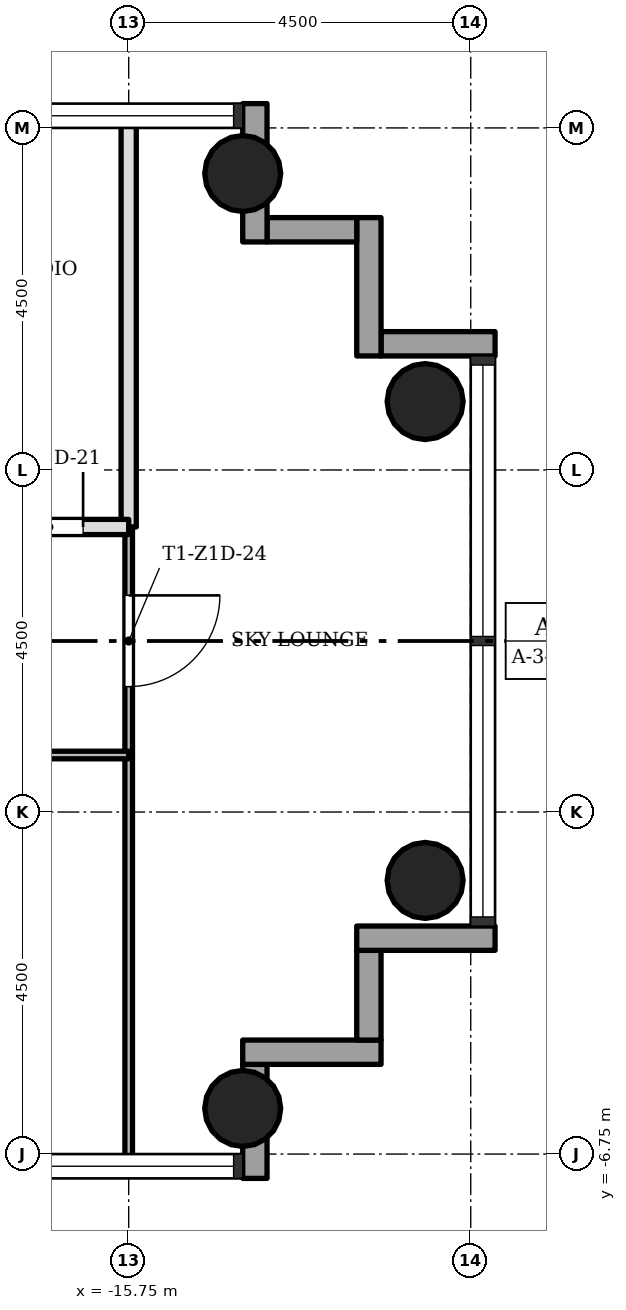
"""IFC4 building model, lengths in metres.
Left out: names, types, materials, properties, quantities, classifications, styles, units other than length and angle.
Written with IfcOpenShell. Run it as: python <this file> out.ifc"""

import sys

from ifc_helpers import new_model, si_unit, direction, frame, frame_2d, origin, origin_2d, place, context, subcontext, project, spatial, rectangle, hollow_circle, extrude, element, fill, save


model = new_model("IFC4")
c1 = context("Model", 3, precision=1e-05, world=origin(), true_north=direction((0.0, 1.0)))
c2 = subcontext(c1, "Body", "Model", "MODEL_VIEW")
j1 = project(units=[si_unit("LENGTHUNIT", "METRE"), si_unit("PLANEANGLEUNIT", "RADIAN")], contexts=[c1])
p1 = place(None, origin())
s1 = spatial("IfcSite", under=j1, at=p1, CompositionType="ELEMENT")
p2 = place(p1, origin())
s2 = spatial("IfcBuilding", under=s1, at=p2, CompositionType="ELEMENT")
p3 = place(p2, frame((0.0, 0.0, 61.9)))
s3 = spatial("IfcBuildingStorey", under=s2, at=p3, CompositionType="ELEMENT", Elevation=61.9)
for number, where, z_axis, x_axis in (
    (1, (-14.25, -6.15, 0.0), (0.0, 0.0, 1.0), (1.0, 0.0, 0.0)),
    (2, (-14.25, 6.15, 0.0), (0.0, 0.0, 1.0), (1.0, 0.0, 0.0)),
    (3, (-11.85, -3.15, 0.0), (0.0, 0.0, 1.0), (1.0, 0.0, 0.0)),
    (4, (-11.85, 3.15, 0.0), (0.0, 0.0, 1.0), (1.0, 0.0, 0.0)),
):
    element("IfcColumn", number, at=place(p3, frame(where, z_axis=z_axis, x_axis=x_axis)), inside=s3, PredefinedType="COLUMN", context=c2, shape_type="SweptSolid", body=[
        extrude(hollow_circle(Radius=0.5, WallThickness=0.036, at=origin_2d()), origin(), (0.0, 0.0, 1.0), 3.4),
    ])
p4 = place(p3, frame((-14.09, -7.07, -0.3), z_axis=(0.0, 0.0, 1.0), x_axis=(0.0, 1.0, 0.0)))
e5 = element("IfcWall", 5, at=p4, inside=s3, PredefinedType="STANDARD", context=c2, shape_type="SweptSolid", body=[
    extrude(rectangle(XDim=1.5, YDim=0.32, at=frame_2d((0.75, 0.0))), origin(), (0.0, 0.0, 1.0), 3.4),
])
p5 = place(p3, frame((-14.25, -5.41, -0.3), z_axis=(0.0, 0.0, 1.0), x_axis=(1.0, 0.0, 0.0)))
e6 = element("IfcWall", 6, at=p5, inside=s3, PredefinedType="STANDARD", context=c2, shape_type="SweptSolid", body=[
    extrude(rectangle(XDim=1.82, YDim=0.32, at=frame_2d((0.91, 0.0))), origin(), (0.0, 0.0, 1.0), 3.4),
])
p6 = place(p3, frame((-12.59, -5.25, -0.3), z_axis=(0.0, 0.0, 1.0), x_axis=(0.0, 1.0, 0.0)))
e7 = element("IfcWall", 7, at=p6, inside=s3, PredefinedType="STANDARD", context=c2, shape_type="SweptSolid", body=[
    extrude(rectangle(XDim=1.18, YDim=0.32, at=frame_2d((0.59, 0.0))), origin(), (0.0, 0.0, 1.0), 3.4),
])
p7 = place(p3, frame((-12.75, -3.91, -0.3), z_axis=(0.0, 0.0, 1.0), x_axis=(1.0, 0.0, 0.0)))
e8 = element("IfcWall", 8, at=p7, inside=s3, PredefinedType="STANDARD", context=c2, shape_type="SweptSolid", body=[
    extrude(rectangle(XDim=1.82, YDim=0.32, at=frame_2d((0.91, 0.0))), origin(), (0.0, 0.0, 1.0), 3.4),
])
p8 = place(p3, frame((-10.93, 3.91, -0.3), z_axis=(0.0, 0.0, 1.0), x_axis=(-1.0, 0.0, 0.0)))
e9 = element("IfcWall", 9, at=p8, inside=s3, PredefinedType="STANDARD", context=c2, shape_type="SweptSolid", body=[
    extrude(rectangle(XDim=1.5, YDim=0.32, at=frame_2d((0.75, 0.0))), origin(), (0.0, 0.0, 1.0), 3.4),
])
p9 = place(p3, frame((-12.59, 3.75, -0.3), z_axis=(0.0, 0.0, 1.0), x_axis=(0.0, 1.0, 0.0)))
e10 = element("IfcWall", 10, at=p9, inside=s3, PredefinedType="STANDARD", context=c2, shape_type="SweptSolid", body=[
    extrude(rectangle(XDim=1.82, YDim=0.32, at=frame_2d((0.91, 0.0))), origin(), (0.0, 0.0, 1.0), 3.4),
])
p10 = place(p3, frame((-12.75, 5.41, -0.3), z_axis=(0.0, 0.0, 1.0), x_axis=(-1.0, 0.0, 0.0)))
e11 = element("IfcWall", 11, at=p10, inside=s3, PredefinedType="STANDARD", context=c2, shape_type="SweptSolid", body=[
    extrude(rectangle(XDim=1.18, YDim=0.32, at=frame_2d((0.59, 0.0))), origin(), (0.0, 0.0, 1.0), 3.4),
])
p11 = place(p3, frame((-14.09, 5.25, -0.3), z_axis=(0.0, 0.0, 1.0), x_axis=(0.0, 1.0, 0.0)))
e12 = element("IfcWall", 12, at=p11, inside=s3, PredefinedType="STANDARD", context=c2, shape_type="SweptSolid", body=[
    extrude(rectangle(XDim=1.82, YDim=0.32, at=frame_2d((0.91, 0.0))), origin(), (0.0, 0.0, 1.0), 3.4),
])
p12 = place(p3, frame((-15.75, -6.85, 0.0), z_axis=(0.0, 0.0, 1.0), x_axis=(0.0, 1.0, 0.0)))
e13 = element("IfcWall", 13, at=p12, inside=s3, PredefinedType="PARTITIONING", context=c2, shape_type="SweptSolid", body=[
    extrude(rectangle(XDim=8.35, YDim=0.1, at=frame_2d((4.175, 0.0))), origin(), (0.0, 0.0, 1.0), 3.0),
])
p13 = place(p12, frame((6.25, 0.0, 0.0)))
e14 = element("IfcOpeningElement", 14, at=p13, cuts=e13, PredefinedType="OPENING", context=c2, shape_type="SweptSolid", body=[
    extrude(rectangle(XDim=1.2, YDim=2.1, at=frame_2d((0.6, 1.05))), frame((0.0, 0.06, 0.0), z_axis=(0.0, -1.0, 0.0), x_axis=(1.0, 0.0, 0.0)), (0.0, 0.0, 1.0), 0.12),
])
p14 = place(p3, frame((-15.75, 1.5, 0.0), z_axis=(0.0, 0.0, 1.0), x_axis=(0.0, 1.0, 0.0)))
e15 = element("IfcWall", 15, at=p14, inside=s3, PredefinedType="SOLIDWALL", context=c2, shape_type="SweptSolid", body=[
    extrude(rectangle(XDim=5.35, YDim=0.2, at=frame_2d((2.675, 0.0))), origin(), (0.0, 0.0, 1.0), 3.0),
])
p15 = place(p3, frame((-20.25, -1.5, 0.0), z_axis=(0.0, 0.0, 1.0), x_axis=(1.0, 0.0, 0.0)))
e16 = element("IfcWall", 16, at=p15, inside=s3, PredefinedType="PARTITIONING", context=c2, shape_type="SweptSolid", body=[
    extrude(rectangle(XDim=4.5, YDim=0.1, at=frame_2d((2.25, 0.0))), origin(), (0.0, 0.0, 1.0), 3.0),
])
p16 = place(p15, frame((1.8, 0.0, 0.0)))
e17 = element("IfcOpeningElement", 17, at=p16, cuts=e16, PredefinedType="OPENING", context=c2, shape_type="SweptSolid", body=[
    extrude(rectangle(XDim=0.9, YDim=2.1, at=frame_2d((0.45, 1.05))), frame((0.0, 0.06, 0.0), z_axis=(0.0, -1.0, 0.0), x_axis=(1.0, 0.0, 0.0)), (0.0, 0.0, 1.0), 0.12),
])
p17 = place(p3, frame((-20.25, 1.5, 0.0), z_axis=(0.0, 0.0, 1.0), x_axis=(1.0, 0.0, 0.0)))
e18 = element("IfcWall", 18, at=p17, inside=s3, PredefinedType="SOLIDWALL", context=c2, shape_type="SweptSolid", body=[
    extrude(rectangle(XDim=4.5, YDim=0.2, at=frame_2d((2.25, 0.0))), origin(), (0.0, 0.0, 1.0), 3.0),
])
p18 = place(p17, frame((3.0, 0.0, 0.0)))
e19 = element("IfcOpeningElement", 19, at=p18, cuts=e18, PredefinedType="OPENING", context=c2, shape_type="SweptSolid", body=[
    extrude(rectangle(XDim=0.9, YDim=2.1, at=frame_2d((0.45, 1.05))), frame((0.0, 0.11, 0.0), z_axis=(0.0, -1.0, 0.0), x_axis=(1.0, 0.0, 0.0)), (0.0, 0.0, 1.0), 0.22),
])
p19 = place(p18, origin())
e20 = element("IfcDoor", 20, at=p19, inside=s3, OperationType="SINGLE_SWING_LEFT", PredefinedType="DOOR", context=c2, shape_type="SweptSolid", body=[
    extrude(rectangle(XDim=0.9, YDim=2.1, at=frame_2d((0.45, 1.05))), frame((0.0, 0.025, 0.0), z_axis=(0.0, -1.0, 0.0), x_axis=(1.0, 0.0, 0.0)), (0.0, 0.0, 1.0), 0.05),
])
fill(e19, e20)
p20 = place(p13, origin())
e21 = element("IfcDoor", 21, at=p20, inside=s3, OperationType="SINGLE_SWING_RIGHT", PredefinedType="DOOR", context=c2, shape_type="SweptSolid", body=[
    extrude(rectangle(XDim=1.2, YDim=2.1, at=frame_2d((0.6, 1.05))), frame((0.0, 0.025, 0.0), z_axis=(0.0, -1.0, 0.0), x_axis=(1.0, 0.0, 0.0)), (0.0, 0.0, 1.0), 0.05),
])
fill(e14, e21)
save(model, sys.argv[1])
